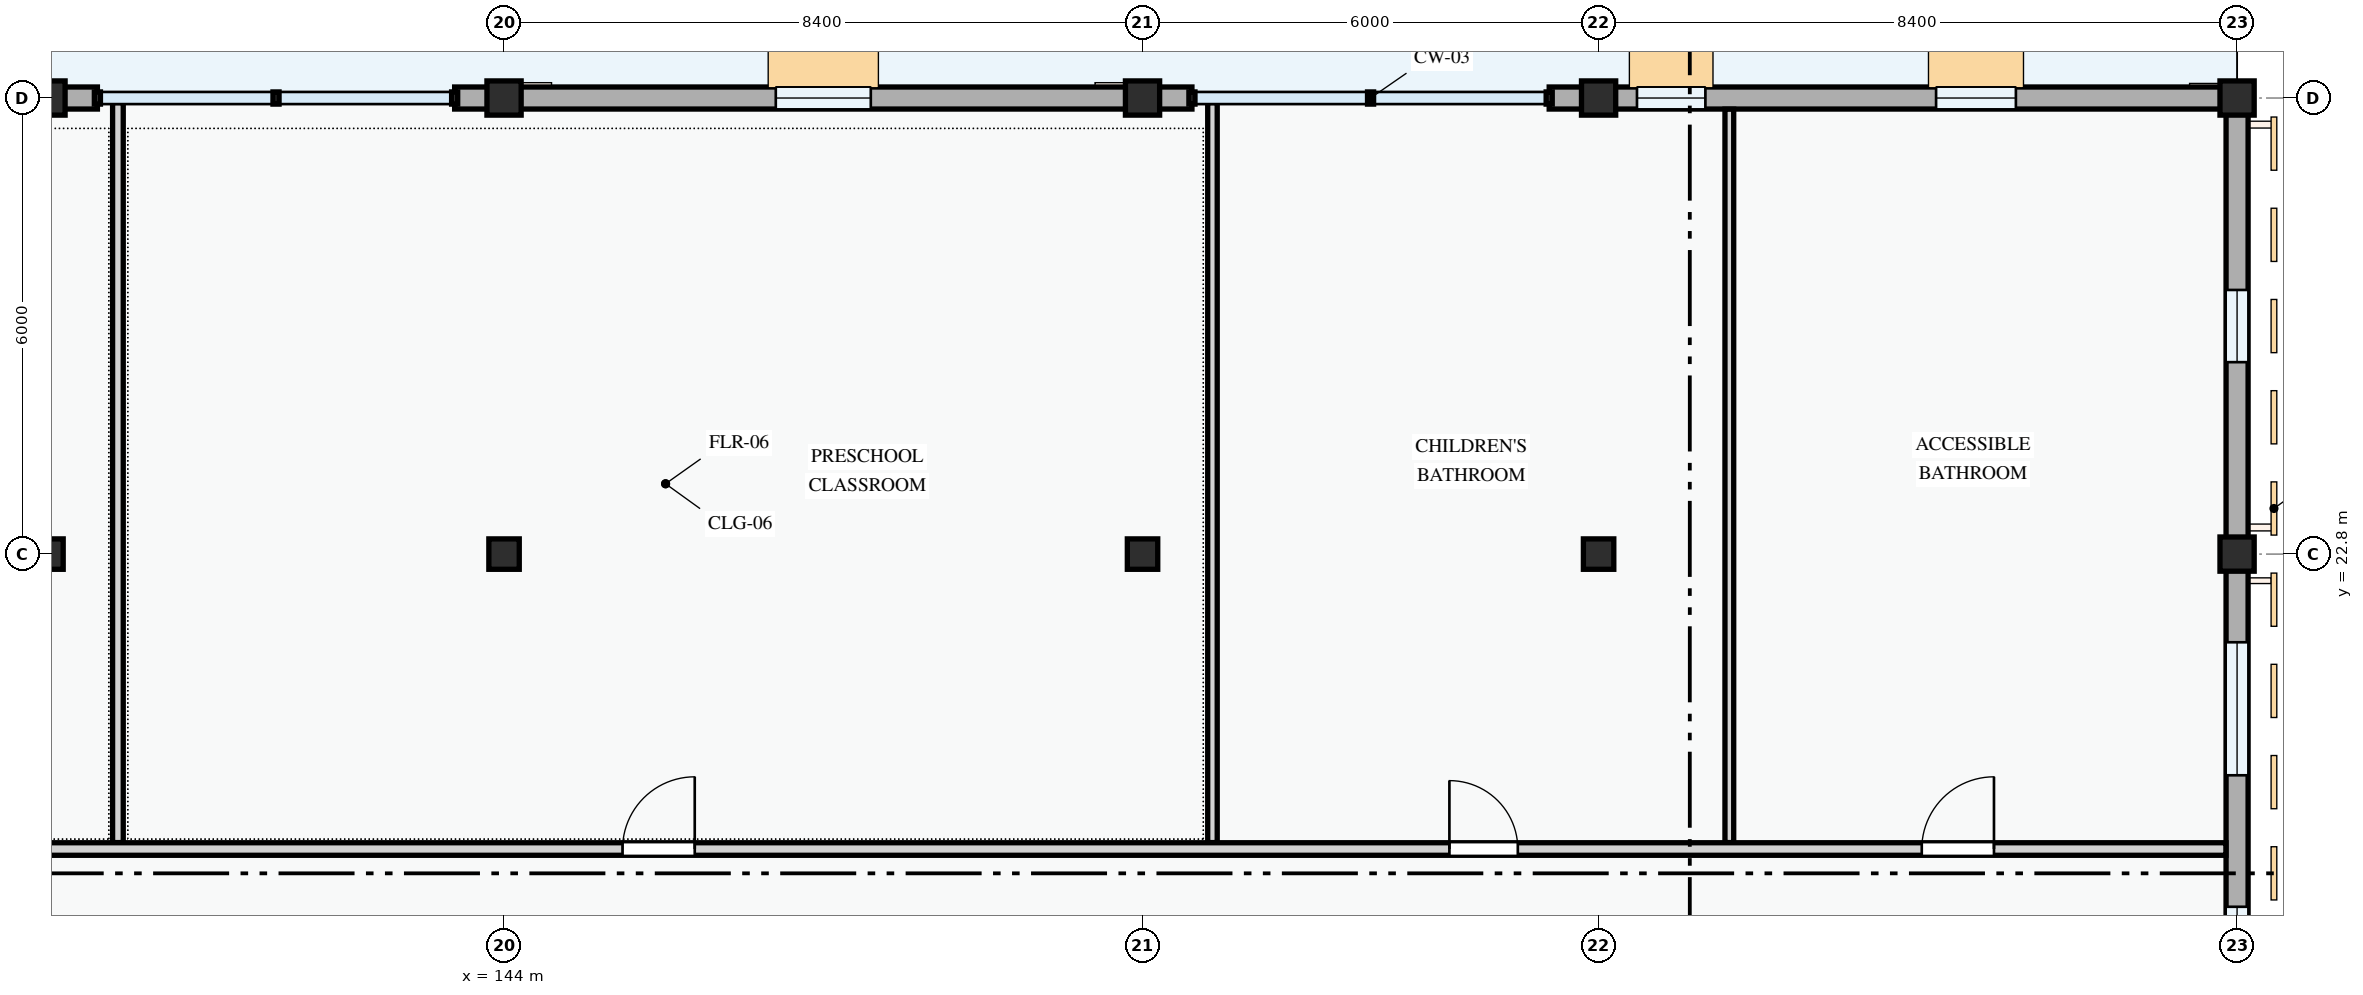
"""IFC4 building model, lengths in metres.
Left out: names, types, materials, properties, quantities, classifications, styles, units other than length and angle.
Written with IfcOpenShell. Run it as: python <this file> out.ifc"""

import sys

from ifc_helpers import new_model, si_unit, direction, frame, frame_2d, origin, origin_2d, place, context, subcontext, project, spatial, rectangle, extrude, element, fill, save


model = new_model("IFC4")
c1 = context("Model", 3, precision=1e-05, world=origin(), true_north=direction((0.0, 1.0)))
c2 = subcontext(c1, "Body", "Model", "MODEL_VIEW")
j1 = project(units=[si_unit("LENGTHUNIT", "METRE"), si_unit("PLANEANGLEUNIT", "RADIAN")], contexts=[c1])
p1 = place(None, origin())
s1 = spatial("IfcSite", under=j1, at=p1, CompositionType="ELEMENT")
p2 = place(p1, origin())
s2 = spatial("IfcBuilding", under=s1, at=p2, CompositionType="ELEMENT")
p3 = place(p2, origin())
s3 = spatial("IfcBuildingStorey", under=s2, at=p3, CompositionType="ELEMENT", Elevation=0.0)
p4 = place(p3, frame((138.0, 22.8, 0.0), z_axis=(0.0, 0.0, 1.0), x_axis=(1.0, 0.0, 0.0)))
e1 = element("IfcColumn", 1, at=p4, inside=s3, PredefinedType="COLUMN", context=c2, shape_type="SweptSolid", body=[
    extrude(rectangle(XDim=0.4, YDim=0.4, at=origin_2d()), origin(), (0.0, 0.0, 1.0), 4.5),
])
p5 = place(p3, frame((138.0, 28.8, 0.0), z_axis=(0.0, 0.0, 1.0), x_axis=(1.0, 0.0, 0.0)))
e2 = element("IfcColumn", 2, at=p5, inside=s3, PredefinedType="COLUMN", context=c2, shape_type="SweptSolid", body=[
    extrude(rectangle(XDim=0.45, YDim=0.45, at=origin_2d()), origin(), (0.0, 0.0, 1.0), 4.5),
])
p6 = place(p3, frame((144.0, 22.8, 0.0), z_axis=(0.0, 0.0, 1.0), x_axis=(1.0, 0.0, 0.0)))
e3 = element("IfcColumn", 3, at=p6, inside=s3, PredefinedType="COLUMN", context=c2, shape_type="SweptSolid", body=[
    extrude(rectangle(XDim=0.4, YDim=0.4, at=origin_2d()), origin(), (0.0, 0.0, 1.0), 4.5),
])
p7 = place(p3, frame((144.0, 28.8, 0.0), z_axis=(0.0, 0.0, 1.0), x_axis=(1.0, 0.0, 0.0)))
e4 = element("IfcColumn", 4, at=p7, inside=s3, PredefinedType="COLUMN", context=c2, shape_type="SweptSolid", body=[
    extrude(rectangle(XDim=0.45, YDim=0.45, at=origin_2d()), origin(), (0.0, 0.0, 1.0), 4.5),
])
p8 = place(p3, frame((152.4, 22.8, 0.0), z_axis=(0.0, 0.0, 1.0), x_axis=(1.0, 0.0, 0.0)))
e5 = element("IfcColumn", 5, at=p8, inside=s3, PredefinedType="COLUMN", context=c2, shape_type="SweptSolid", body=[
    extrude(rectangle(XDim=0.4, YDim=0.4, at=origin_2d()), origin(), (0.0, 0.0, 1.0), 4.5),
])
p9 = place(p3, frame((152.4, 28.8, 0.0), z_axis=(0.0, 0.0, 1.0), x_axis=(1.0, 0.0, 0.0)))
e6 = element("IfcColumn", 6, at=p9, inside=s3, PredefinedType="COLUMN", context=c2, shape_type="SweptSolid", body=[
    extrude(rectangle(XDim=0.45, YDim=0.45, at=origin_2d()), origin(), (0.0, 0.0, 1.0), 4.5),
])
p10 = place(p3, frame((158.4, 22.8, 0.0), z_axis=(0.0, 0.0, 1.0), x_axis=(1.0, 0.0, 0.0)))
e7 = element("IfcColumn", 7, at=p10, inside=s3, PredefinedType="COLUMN", context=c2, shape_type="SweptSolid", body=[
    extrude(rectangle(XDim=0.4, YDim=0.4, at=origin_2d()), origin(), (0.0, 0.0, 1.0), 4.5),
])
for number, where, z_axis, x_axis in (
    (8, (158.4, 28.8, 0.0), (0.0, 0.0, 1.0), (1.0, 0.0, 0.0)),
    (9, (166.8, 22.8, 0.0), (0.0, 0.0, 1.0), (1.0, 0.0, 0.0)),
    (10, (166.8, 28.8, 0.0), (0.0, 0.0, 1.0), (1.0, 0.0, 0.0)),
):
    element("IfcColumn", number, at=place(p3, frame(where, z_axis=z_axis, x_axis=x_axis)), inside=s3, PredefinedType="COLUMN", context=c2, shape_type="SweptSolid", body=[
        extrude(rectangle(XDim=0.45, YDim=0.45, at=origin_2d()), origin(), (0.0, 0.0, 1.0), 4.5),
    ])
p11 = place(p3, frame((166.8, 14.4, 0.0), z_axis=(0.0, 0.0, 1.0), x_axis=(0.0, 1.0, 0.0)))
e11 = element("IfcWall", 11, at=p11, inside=s3, PredefinedType="STANDARD", context=c2, shape_type="SweptSolid", body=[
    extrude(rectangle(XDim=8.4, YDim=0.29, at=frame_2d((4.2, 0.0))), origin(), (0.0, 0.0, 1.0), 3.485),
])
p12 = place(p11, frame((2.18, 0.0, 0.72)))
e12 = element("IfcOpeningElement", 12, at=p12, cuts=e11, PredefinedType="OPENING", context=c2, shape_type="SweptSolid", body=[
    extrude(rectangle(XDim=1.58, YDim=1.48, at=frame_2d((0.79, 0.74))), frame((0.0, 0.155, 0.0), z_axis=(0.0, -1.0, 0.0), x_axis=(1.0, 0.0, 0.0)), (0.0, 0.0, 1.0), 0.31),
])
p13 = place(p11, frame((5.49, 0.0, 0.72)))
e13 = element("IfcOpeningElement", 13, at=p13, cuts=e11, PredefinedType="OPENING", context=c2, shape_type="SweptSolid", body=[
    extrude(rectangle(XDim=1.75, YDim=1.45, at=frame_2d((0.875, 0.725))), frame((0.0, 0.155, 0.0), z_axis=(0.0, -1.0, 0.0), x_axis=(1.0, 0.0, 0.0)), (0.0, 0.0, 1.0), 0.31),
])
p14 = place(p3, frame((166.8, 22.8, 0.0), z_axis=(0.0, 0.0, 1.0), x_axis=(0.0, 1.0, 0.0)))
e14 = element("IfcWall", 14, at=p14, inside=s3, PredefinedType="STANDARD", context=c2, shape_type="SweptSolid", body=[
    extrude(rectangle(XDim=6.0, YDim=0.29, at=frame_2d((3.0, 0.0))), origin(), (0.0, 0.0, 1.0), 3.585),
])
p15 = place(p14, frame((2.525, 0.0, 0.72)))
e15 = element("IfcOpeningElement", 15, at=p15, cuts=e14, PredefinedType="OPENING", context=c2, shape_type="SweptSolid", body=[
    extrude(rectangle(XDim=0.95, YDim=1.15, at=frame_2d((0.475, 0.575))), frame((0.0, 0.155, 0.0), z_axis=(0.0, -1.0, 0.0), x_axis=(1.0, 0.0, 0.0)), (0.0, 0.0, 1.0), 0.31),
])
p16 = place(p3, frame((166.8, 28.8, 0.0), z_axis=(0.0, 0.0, 1.0), x_axis=(-1.0, 0.0, 0.0)))
e16 = element("IfcWall", 16, at=p16, inside=s3, PredefinedType="STANDARD", context=c2, shape_type="SweptSolid", body=[
    extrude(rectangle(XDim=8.4, YDim=0.29, at=frame_2d((4.2, 0.0))), origin(), (0.0, 0.0, 1.0), 3.485),
])
p17 = place(p16, frame((2.91, 0.0, 0.72)))
e17 = element("IfcOpeningElement", 17, at=p17, cuts=e16, PredefinedType="OPENING", context=c2, shape_type="SweptSolid", body=[
    extrude(rectangle(XDim=1.05, YDim=1.2, at=frame_2d((0.525, 0.6))), frame((0.0, 0.155, 0.0), z_axis=(0.0, -1.0, 0.0), x_axis=(1.0, 0.0, 0.0)), (0.0, 0.0, 1.0), 0.31),
])
p18 = place(p16, frame((6.995, 0.0, 0.72)))
e18 = element("IfcOpeningElement", 18, at=p18, cuts=e16, PredefinedType="OPENING", context=c2, shape_type="SweptSolid", body=[
    extrude(rectangle(XDim=0.9, YDim=1.2, at=frame_2d((0.45, 0.6))), frame((0.0, 0.155, 0.0), z_axis=(0.0, -1.0, 0.0), x_axis=(1.0, 0.0, 0.0)), (0.0, 0.0, 1.0), 0.31),
])
p19 = place(p3, frame((158.4, 28.8, 0.0), z_axis=(0.0, 0.0, 1.0), x_axis=(-1.0, 0.0, 0.0)))
e19 = element("IfcWall", 19, at=p19, inside=s3, PredefinedType="STANDARD", context=c2, shape_type="SweptSolid", body=[
    extrude(rectangle(XDim=0.65, YDim=0.29, at=frame_2d((0.325, 0.0))), origin(), (0.0, 0.0, 1.0), 3.585),
])
p20 = place(p3, frame((153.05, 28.8, 0.0), z_axis=(0.0, 0.0, 1.0), x_axis=(-1.0, 0.0, 0.0)))
e20 = element("IfcWall", 20, at=p20, inside=s3, PredefinedType="STANDARD", context=c2, shape_type="SweptSolid", body=[
    extrude(rectangle(XDim=0.65, YDim=0.29, at=frame_2d((0.325, 0.0))), origin(), (0.0, 0.0, 1.0), 3.585),
])
p21 = place(p3, frame((152.4, 28.8, 0.0), z_axis=(0.0, 0.0, 1.0), x_axis=(-1.0, 0.0, 0.0)))
e21 = element("IfcWall", 21, at=p21, inside=s3, PredefinedType="STANDARD", context=c2, shape_type="SweptSolid", body=[
    extrude(rectangle(XDim=8.4, YDim=0.29, at=frame_2d((4.2, 0.0))), origin(), (0.0, 0.0, 1.0), 3.485),
])
p22 = place(p21, frame((3.575, 0.0, 0.72)))
e22 = element("IfcOpeningElement", 22, at=p22, cuts=e21, PredefinedType="OPENING", context=c2, shape_type="SweptSolid", body=[
    extrude(rectangle(XDim=1.25, YDim=1.3, at=frame_2d((0.625, 0.65))), frame((0.0, 0.155, 0.0), z_axis=(0.0, -1.0, 0.0), x_axis=(1.0, 0.0, 0.0)), (0.0, 0.0, 1.0), 0.31),
])
for number, where, z_axis, x_axis in (
    (23, (144.0, 28.8, 0.0), (0.0, 0.0, 1.0), (-1.0, 0.0, 0.0)),
    (24, (138.65, 28.8, 0.0), (0.0, 0.0, 1.0), (-1.0, 0.0, 0.0)),
):
    element("IfcWall", number, at=place(p3, frame(where, z_axis=z_axis, x_axis=x_axis)), inside=s3, PredefinedType="STANDARD", context=c2, shape_type="SweptSolid", body=[
        extrude(rectangle(XDim=0.65, YDim=0.29, at=frame_2d((0.325, 0.0))), origin(), (0.0, 0.0, 1.0), 3.585),
    ])
p23 = place(p3, frame((138.92, 19.004, 0.0), z_axis=(0.0, 0.0, 1.0), x_axis=(0.0, 1.0, 0.0)))
e25 = element("IfcWall", 25, at=p23, inside=s3, PredefinedType="PARTITIONING", context=c2, shape_type="SweptSolid", body=[
    extrude(rectangle(XDim=9.736, YDim=0.14, at=frame_2d((4.868, 0.0))), origin(), (0.0, 0.0, 1.0), 4.2),
])
p24 = place(p3, frame((153.32, 19.004, 0.0), z_axis=(0.0, 0.0, 1.0), x_axis=(0.0, 1.0, 0.0)))
e26 = element("IfcWall", 26, at=p24, inside=s3, PredefinedType="PARTITIONING", context=c2, shape_type="SweptSolid", body=[
    extrude(rectangle(XDim=9.736, YDim=0.125, at=frame_2d((4.868, 0.0))), origin(), (0.0, 0.0, 1.0), 4.2),
])
p25 = place(p3, frame((160.12, 19.004, 0.0), z_axis=(0.0, 0.0, 1.0), x_axis=(0.0, 1.0, 0.0)))
e27 = element("IfcWall", 27, at=p25, inside=s3, PredefinedType="PARTITIONING", context=c2, shape_type="SweptSolid", body=[
    extrude(rectangle(XDim=9.649, YDim=0.115, at=frame_2d((4.824, 0.0))), origin(), (0.0, 0.0, 1.0), 4.2),
])
p26 = place(p3, frame((123.747, 18.92, 0.0), z_axis=(0.0, 0.0, 1.0), x_axis=(1.0, 0.0, 0.0)))
e28 = element("IfcWall", 28, at=p26, inside=s3, PredefinedType="PARTITIONING", context=c2, shape_type="SweptSolid", body=[
    extrude(rectangle(XDim=42.906, YDim=0.165, at=frame_2d((21.453, 0.0))), origin(), (0.0, 0.0, 1.0), 4.2),
])
p27 = place(p26, frame((7.637, 0.0, 0.0)))
e29 = element("IfcOpeningElement", 29, at=p27, cuts=e28, PredefinedType="OPENING", context=c2, shape_type="SweptSolid", body=[
    extrude(rectangle(XDim=0.95, YDim=2.1, at=frame_2d((0.475, 1.05))), frame((0.0, 0.093, 0.0), z_axis=(0.0, -1.0, 0.0), x_axis=(1.0, 0.0, 0.0)), (0.0, 0.0, 1.0), 0.185),
])
p28 = place(p26, frame((21.812, 0.0, 0.0)))
e30 = element("IfcOpeningElement", 30, at=p28, cuts=e28, PredefinedType="OPENING", context=c2, shape_type="SweptSolid", body=[
    extrude(rectangle(XDim=0.95, YDim=2.1, at=frame_2d((0.475, 1.05))), frame((0.0, 0.093, 0.0), z_axis=(0.0, -1.0, 0.0), x_axis=(1.0, 0.0, 0.0)), (0.0, 0.0, 1.0), 0.185),
])
p29 = place(p26, frame((32.69, 0.0, 0.0)))
e31 = element("IfcOpeningElement", 31, at=p29, cuts=e28, PredefinedType="OPENING", context=c2, shape_type="SweptSolid", body=[
    extrude(rectangle(XDim=0.9, YDim=2.1, at=frame_2d((0.45, 1.05))), frame((0.0, 0.093, 0.0), z_axis=(0.0, -1.0, 0.0), x_axis=(1.0, 0.0, 0.0)), (0.0, 0.0, 1.0), 0.185),
])
p30 = place(p26, frame((38.905, 0.0, 0.0)))
e32 = element("IfcOpeningElement", 32, at=p30, cuts=e28, PredefinedType="OPENING", context=c2, shape_type="SweptSolid", body=[
    extrude(rectangle(XDim=0.95, YDim=2.1, at=frame_2d((0.475, 1.05))), frame((0.0, 0.093, 0.0), z_axis=(0.0, -1.0, 0.0), x_axis=(1.0, 0.0, 0.0)), (0.0, 0.0, 1.0), 0.185),
])
p31 = place(p12, origin())
e33 = element("IfcWindow", 33, at=p31, inside=s3, PartitioningType="SINGLE_PANEL", PredefinedType="WINDOW", context=c2, shape_type="SweptSolid", body=[
    extrude(rectangle(XDim=1.58, YDim=1.48, at=frame_2d((0.79, 0.74))), frame((0.0, 0.03, 0.0), z_axis=(0.0, -1.0, 0.0), x_axis=(1.0, 0.0, 0.0)), (0.0, 0.0, 1.0), 0.06),
])
fill(e12, e33)
p32 = place(p13, origin())
e34 = element("IfcWindow", 34, at=p32, inside=s3, PartitioningType="DOUBLE_PANEL_VERTICAL", PredefinedType="WINDOW", context=c2, shape_type="SweptSolid", body=[
    extrude(rectangle(XDim=1.75, YDim=1.45, at=frame_2d((0.875, 0.725))), frame((0.0, 0.03, 0.0), z_axis=(0.0, -1.0, 0.0), x_axis=(1.0, 0.0, 0.0)), (0.0, 0.0, 1.0), 0.06),
])
fill(e13, e34)
p33 = place(p15, origin())
e35 = element("IfcWindow", 35, at=p33, inside=s3, PartitioningType="SINGLE_PANEL", PredefinedType="WINDOW", context=c2, shape_type="SweptSolid", body=[
    extrude(rectangle(XDim=0.95, YDim=1.15, at=frame_2d((0.475, 0.575))), frame((0.0, 0.03, 0.0), z_axis=(0.0, -1.0, 0.0), x_axis=(1.0, 0.0, 0.0)), (0.0, 0.0, 1.0), 0.06),
])
fill(e15, e35)
p34 = place(p17, origin())
e36 = element("IfcWindow", 36, at=p34, inside=s3, PartitioningType="SINGLE_PANEL", PredefinedType="WINDOW", context=c2, shape_type="SweptSolid", body=[
    extrude(rectangle(XDim=1.05, YDim=1.2, at=frame_2d((0.525, 0.6))), frame((0.0, 0.03, 0.0), z_axis=(0.0, -1.0, 0.0), x_axis=(1.0, 0.0, 0.0)), (0.0, 0.0, 1.0), 0.06),
])
fill(e17, e36)
p35 = place(p18, origin())
e37 = element("IfcWindow", 37, at=p35, inside=s3, PartitioningType="SINGLE_PANEL", PredefinedType="WINDOW", context=c2, shape_type="SweptSolid", body=[
    extrude(rectangle(XDim=0.9, YDim=1.2, at=frame_2d((0.45, 0.6))), frame((0.0, 0.03, 0.0), z_axis=(0.0, -1.0, 0.0), x_axis=(1.0, 0.0, 0.0)), (0.0, 0.0, 1.0), 0.06),
])
fill(e18, e37)
p36 = place(p22, origin())
e38 = element("IfcWindow", 38, at=p36, inside=s3, PartitioningType="SINGLE_PANEL", PredefinedType="WINDOW", context=c2, shape_type="SweptSolid", body=[
    extrude(rectangle(XDim=1.25, YDim=1.3, at=frame_2d((0.625, 0.65))), frame((0.0, 0.03, 0.0), z_axis=(0.0, -1.0, 0.0), x_axis=(1.0, 0.0, 0.0)), (0.0, 0.0, 1.0), 0.06),
])
fill(e22, e38)
p37 = place(p28, origin())
e39 = element("IfcDoor", 39, at=p37, inside=s3, OperationType="SINGLE_SWING_RIGHT", PredefinedType="DOOR", context=c2, shape_type="SweptSolid", body=[
    extrude(rectangle(XDim=0.95, YDim=2.1, at=frame_2d((0.475, 1.05))), frame((0.0, 0.025, 0.0), z_axis=(0.0, -1.0, 0.0), x_axis=(1.0, 0.0, 0.0)), (0.0, 0.0, 1.0), 0.05),
])
fill(e30, e39)
p38 = place(p29, origin())
e40 = element("IfcDoor", 40, at=p38, inside=s3, OperationType="SINGLE_SWING_LEFT", PredefinedType="DOOR", context=c2, shape_type="SweptSolid", body=[
    extrude(rectangle(XDim=0.9, YDim=2.1, at=frame_2d((0.45, 1.05))), frame((0.0, 0.025, 0.0), z_axis=(0.0, -1.0, 0.0), x_axis=(1.0, 0.0, 0.0)), (0.0, 0.0, 1.0), 0.05),
])
fill(e31, e40)
p39 = place(p30, origin())
e41 = element("IfcDoor", 41, at=p39, inside=s3, OperationType="SINGLE_SWING_RIGHT", PredefinedType="DOOR", context=c2, shape_type="SweptSolid", body=[
    extrude(rectangle(XDim=0.95, YDim=2.1, at=frame_2d((0.475, 1.05))), frame((0.0, 0.025, 0.0), z_axis=(0.0, -1.0, 0.0), x_axis=(1.0, 0.0, 0.0)), (0.0, 0.0, 1.0), 0.05),
])
fill(e32, e41)
save(model, sys.argv[1])
